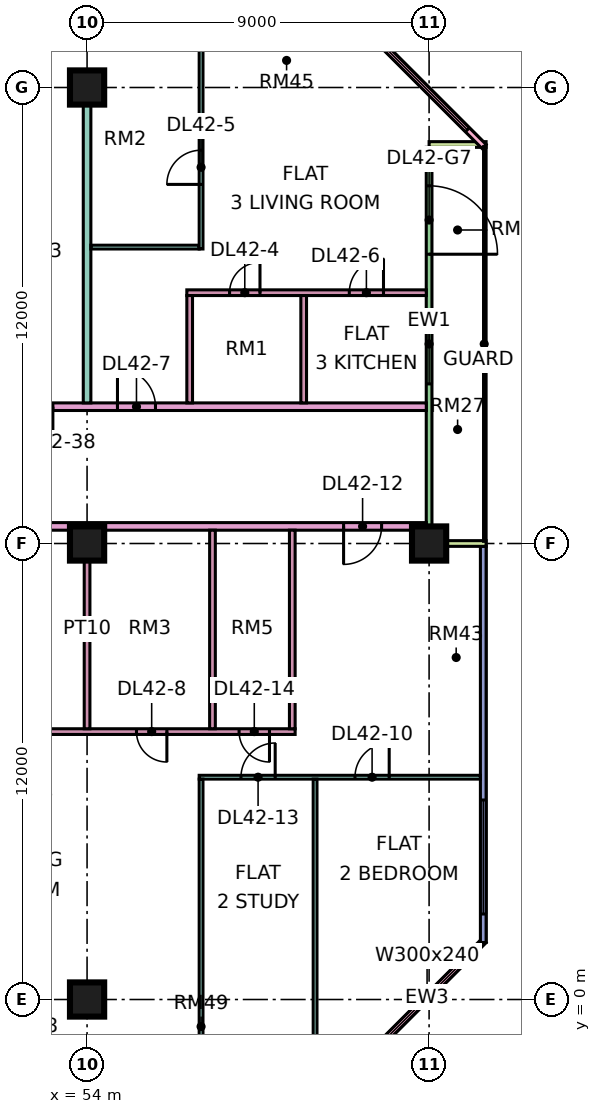
"""IFC4 building model, lengths in metres.
Left out: names, types, materials, properties, quantities, classifications, styles, units other than length and angle.
Written with IfcOpenShell. Run it as: python <this file> out.ifc"""

import sys

from ifc_helpers import new_model, si_unit, direction, frame, frame_2d, origin, origin_2d, place, context, subcontext, project, spatial, rectangle, extrude, element, fill, save


model = new_model("IFC4")
c1 = context("Model", 3, precision=1e-05, world=origin(), true_north=direction((0.0, 1.0)))
c2 = subcontext(c1, "Body", "Model", "MODEL_VIEW")
j1 = project(units=[si_unit("LENGTHUNIT", "METRE"), si_unit("PLANEANGLEUNIT", "RADIAN")], contexts=[c1])
p1 = place(None, origin())
s1 = spatial("IfcSite", under=j1, at=p1, CompositionType="ELEMENT")
p2 = place(p1, origin())
s2 = spatial("IfcBuilding", under=s1, at=p2, CompositionType="ELEMENT")
p3 = place(p2, frame((0.0, 0.0, 183.65)))
s3 = spatial("IfcBuildingStorey", under=s2, at=p3, CompositionType="ELEMENT", Elevation=183.65)
for number, where, z_axis, x_axis in (
    (1, (54.0, 0.0, 0.0), (0.0, 0.0, 1.0), (1.0, 0.0, 0.0)),
    (2, (54.0, 12.0, 0.0), (0.0, 0.0, 1.0), (1.0, 0.0, 0.0)),
    (3, (54.0, 24.0, 0.0), (0.0, 0.0, 1.0), (1.0, 0.0, 0.0)),
    (4, (63.0, 12.0, 0.0), (0.0, 0.0, 1.0), (1.0, 0.0, 0.0)),
):
    element("IfcColumn", number, at=place(p3, frame(where, z_axis=z_axis, x_axis=x_axis)), inside=s3, PredefinedType="COLUMN", context=c2, shape_type="SweptSolid", body=[
        extrude(rectangle(XDim=0.9, YDim=0.9, at=origin_2d()), origin(), (0.0, 0.0, 1.0), 3.75),
    ])
p4 = place(p3, frame((61.447, -1.447, 0.0), z_axis=(0.0, 0.0, 1.0), x_axis=(0.707106781187, 0.707106781187, 0.0)))
e5 = element("IfcWall", 5, at=p4, inside=s3, PredefinedType="SOLIDWALL", context=c2, shape_type="SweptSolid", body=[
    extrude(rectangle(XDim=4.243, YDim=0.15, at=frame_2d((2.121, 0.0))), origin(), (0.0, 0.0, 1.0), 3.35),
])
p5 = place(p4, frame((0.621, 0.0, 0.45)))
e6 = element("IfcOpeningElement", 6, at=p5, cuts=e5, PredefinedType="OPENING", context=c2, shape_type="SweptSolid", body=[
    extrude(rectangle(XDim=3.0, YDim=2.4, at=frame_2d((1.5, 1.2))), frame((0.0, 0.085, 0.0), z_axis=(0.0, -1.0, 0.0), x_axis=(1.0, 0.0, 0.0)), (0.0, 0.0, 1.0), 0.17),
])
p6 = place(p3, frame((64.425, 1.5, 0.0), z_axis=(0.0, 0.0, 1.0), x_axis=(0.0, 1.0, 0.0)))
e7 = element("IfcWall", 7, at=p6, inside=s3, PredefinedType="SOLIDWALL", context=c2, shape_type="SweptSolid", body=[
    extrude(rectangle(XDim=10.425, YDim=0.15, at=frame_2d((5.212, 0.0))), origin(), (0.0, 0.0, 1.0), 3.35),
])
p7 = place(p6, frame((0.75, 0.0, 0.45)))
e8 = element("IfcOpeningElement", 8, at=p7, cuts=e7, PredefinedType="OPENING", context=c2, shape_type="SweptSolid", body=[
    extrude(rectangle(XDim=3.0, YDim=2.4, at=frame_2d((1.5, 1.2))), frame((0.0, 0.085, 0.0), z_axis=(0.0, -1.0, 0.0), x_axis=(1.0, 0.0, 0.0)), (0.0, 0.0, 1.0), 0.17),
])
p8 = place(p3, frame((63.0, 12.075, 0.0), z_axis=(0.0, 0.0, 1.0), x_axis=(0.0, 1.0, 0.0)))
e9 = element("IfcWall", 9, at=p8, inside=s3, PredefinedType="SOLIDWALL", context=c2, shape_type="SweptSolid", body=[
    extrude(rectangle(XDim=10.35, YDim=0.15, at=frame_2d((5.175, 0.0))), origin(), (0.0, 0.0, 1.0), 3.35),
])
p9 = place(p8, frame((4.125, 0.0, 0.45)))
e10 = element("IfcOpeningElement", 10, at=p9, cuts=e9, PredefinedType="OPENING", context=c2, shape_type="SweptSolid", body=[
    extrude(rectangle(XDim=1.8, YDim=2.4, at=frame_2d((0.9, 1.2))), frame((0.0, 0.085, 0.0), z_axis=(0.0, -1.0, 0.0), x_axis=(1.0, 0.0, 0.0)), (0.0, 0.0, 1.0), 0.17),
])
p10 = place(p8, frame((7.538, 0.0, 0.0)))
e11 = element("IfcOpeningElement", 11, at=p10, cuts=e9, PredefinedType="OPENING", context=c2, shape_type="SweptSolid", body=[
    extrude(rectangle(XDim=1.8, YDim=2.4, at=frame_2d((0.9, 1.2))), frame((0.0, 0.085, 0.0), z_axis=(0.0, -1.0, 0.0), x_axis=(1.0, 0.0, 0.0)), (0.0, 0.0, 1.0), 0.17),
])
for number, where, z_axis, x_axis in (
    (12, (64.5, 12.0, 0.0), (0.0, 0.0, 1.0), (-1.0, 0.0, 0.0)),
    (13, (64.5, 22.5, 0.0), (0.0, 0.0, 1.0), (-1.0, 0.0, 0.0)),
):
    element("IfcWall", number, at=place(p3, frame(where, z_axis=z_axis, x_axis=x_axis)), inside=s3, PredefinedType="SOLIDWALL", context=c2, shape_type="SweptSolid", body=[
        extrude(rectangle(XDim=1.5, YDim=0.15, at=frame_2d((0.75, 0.0))), origin(), (0.0, 0.0, 1.0), 3.35),
    ])
p11 = place(p3, frame((64.447, 22.447, 0.0), z_axis=(0.0, 0.0, 1.0), x_axis=(-0.707106781187, 0.707106781187, 0.0)))
e14 = element("IfcWall", 14, at=p11, inside=s3, PredefinedType="SOLIDWALL", context=c2, shape_type="SweptSolid", body=[
    extrude(rectangle(XDim=4.243, YDim=0.15, at=frame_2d((2.121, 0.0))), origin(), (0.0, 0.0, 1.0), 3.35),
])
p12 = place(p11, frame((0.621, 0.0, 0.45)))
e15 = element("IfcOpeningElement", 15, at=p12, cuts=e14, PredefinedType="OPENING", context=c2, shape_type="SweptSolid", body=[
    extrude(rectangle(XDim=3.0, YDim=2.4, at=frame_2d((1.5, 1.2))), frame((0.0, 0.085, 0.0), z_axis=(0.0, -1.0, 0.0), x_axis=(1.0, 0.0, 0.0)), (0.0, 0.0, 1.0), 0.17),
])
p13 = place(p3, frame((40.65, 12.45, 0.0), z_axis=(0.0, 0.0, 1.0), x_axis=(1.0, 0.0, 0.0)))
e16 = element("IfcWall", 16, at=p13, inside=s3, PredefinedType="PARTITIONING", context=c2, shape_type="SweptSolid", body=[
    extrude(rectangle(XDim=22.276, YDim=0.2, at=frame_2d((11.138, 0.0))), origin(), (0.0, 0.0, 1.0), 3.35),
])
p14 = place(p13, frame((20.1, 0.0, 0.0)))
e17 = element("IfcOpeningElement", 17, at=p14, cuts=e16, PredefinedType="OPENING", context=c2, shape_type="SweptSolid", body=[
    extrude(rectangle(XDim=1.0, YDim=2.1, at=frame_2d((0.5, 1.05))), frame((0.0, 0.11, 0.0), z_axis=(0.0, -1.0, 0.0), x_axis=(1.0, 0.0, 0.0)), (0.0, 0.0, 1.0), 0.22),
])
p15 = place(p13, frame((1.05, 0.0, 0.0)))
e18 = element("IfcOpeningElement", 18, at=p15, cuts=e16, PredefinedType="OPENING", context=c2, shape_type="SweptSolid", body=[
    extrude(rectangle(XDim=1.0, YDim=2.1, at=frame_2d((0.5, 1.05))), frame((0.0, 0.11, 0.0), z_axis=(0.0, -1.0, 0.0), x_axis=(1.0, 0.0, 0.0)), (0.0, 0.0, 1.0), 0.22),
])
p16 = place(p3, frame((48.1, 7.05, 0.0), z_axis=(0.0, 0.0, 1.0), x_axis=(1.0, 0.0, 0.0)))
e19 = element("IfcWall", 19, at=p16, inside=s3, PredefinedType="PARTITIONING", context=c2, shape_type="SweptSolid", body=[
    extrude(rectangle(XDim=11.375, YDim=0.15, at=frame_2d((5.688, 0.0))), origin(), (0.0, 0.0, 1.0), 3.35),
])
p17 = place(p16, frame((7.2, 0.0, 0.0)))
e20 = element("IfcOpeningElement", 20, at=p17, cuts=e19, PredefinedType="OPENING", context=c2, shape_type="SweptSolid", body=[
    extrude(rectangle(XDim=0.8, YDim=2.1, at=frame_2d((0.4, 1.05))), frame((0.0, 0.085, 0.0), z_axis=(0.0, -1.0, 0.0), x_axis=(1.0, 0.0, 0.0)), (0.0, 0.0, 1.0), 0.17),
])
p18 = place(p16, frame((2.45, 0.0, 0.0)))
e21 = element("IfcOpeningElement", 21, at=p18, cuts=e19, PredefinedType="OPENING", context=c2, shape_type="SweptSolid", body=[
    extrude(rectangle(XDim=0.9, YDim=2.1, at=frame_2d((0.45, 1.05))), frame((0.0, 0.085, 0.0), z_axis=(0.0, -1.0, 0.0), x_axis=(1.0, 0.0, 0.0)), (0.0, 0.0, 1.0), 0.17),
])
p19 = place(p16, frame((9.9, 0.0, 0.0)))
e22 = element("IfcOpeningElement", 22, at=p19, cuts=e19, PredefinedType="OPENING", context=c2, shape_type="SweptSolid", body=[
    extrude(rectangle(XDim=0.8, YDim=2.1, at=frame_2d((0.4, 1.05))), frame((0.0, 0.085, 0.0), z_axis=(0.0, -1.0, 0.0), x_axis=(1.0, 0.0, 0.0)), (0.0, 0.0, 1.0), 0.17),
])
p20 = place(p3, frame((51.225, 15.6, 0.0), z_axis=(0.0, 0.0, 1.0), x_axis=(1.0, 0.0, 0.0)))
e23 = element("IfcWall", 23, at=p20, inside=s3, PredefinedType="PARTITIONING", context=c2, shape_type="SweptSolid", body=[
    extrude(rectangle(XDim=11.701, YDim=0.2, at=frame_2d((5.851, 0.0))), origin(), (0.0, 0.0, 1.0), 3.35),
])
p21 = place(p20, frame((3.575, 0.0, 0.0)))
e24 = element("IfcOpeningElement", 24, at=p21, cuts=e23, PredefinedType="OPENING", context=c2, shape_type="SweptSolid", body=[
    extrude(rectangle(XDim=1.0, YDim=2.1, at=frame_2d((0.5, 1.05))), frame((0.0, 0.11, 0.0), z_axis=(0.0, -1.0, 0.0), x_axis=(1.0, 0.0, 0.0)), (0.0, 0.0, 1.0), 0.22),
])
p22 = place(p20, frame((0.875, 0.0, 0.0)))
e25 = element("IfcOpeningElement", 25, at=p22, cuts=e23, PredefinedType="OPENING", context=c2, shape_type="SweptSolid", body=[
    extrude(rectangle(XDim=1.0, YDim=2.1, at=frame_2d((0.5, 1.05))), frame((0.0, 0.11, 0.0), z_axis=(0.0, -1.0, 0.0), x_axis=(1.0, 0.0, 0.0)), (0.0, 0.0, 1.0), 0.22),
])
p23 = place(p3, frame((54.0, 7.125, 0.0), z_axis=(0.0, 0.0, 1.0), x_axis=(0.0, 1.0, 0.0)))
e26 = element("IfcWall", 26, at=p23, inside=s3, PredefinedType="PARTITIONING", context=c2, shape_type="SweptSolid", body=[
    extrude(rectangle(XDim=5.225, YDim=0.15, at=frame_2d((2.613, 0.0))), origin(), (0.0, 0.0, 1.0), 3.35),
])
p24 = place(p3, frame((54.0, 15.7, 0.0), z_axis=(0.0, 0.0, 1.0), x_axis=(0.0, 1.0, 0.0)))
e27 = element("IfcWall", 27, at=p24, inside=s3, PredefinedType="PARTITIONING", context=c2, shape_type="SweptSolid", body=[
    extrude(rectangle(XDim=8.3, YDim=0.2, at=frame_2d((4.15, 0.0))), origin(), (0.0, 0.0, 1.0), 3.35),
])
p25 = place(p3, frame((54.1, 19.8, 0.0), z_axis=(0.0, 0.0, 1.0), x_axis=(1.0, 0.0, 0.0)))
e28 = element("IfcWall", 28, at=p25, inside=s3, PredefinedType="PARTITIONING", context=c2, shape_type="SweptSolid", body=[
    extrude(rectangle(XDim=2.85, YDim=0.1, at=frame_2d((1.425, 0.0))), origin(), (0.0, 0.0, 1.0), 3.35),
])
p26 = place(p3, frame((56.625, 18.6, 0.0), z_axis=(0.0, 0.0, 1.0), x_axis=(1.0, 0.0, 0.0)))
e29 = element("IfcWall", 29, at=p26, inside=s3, PredefinedType="PARTITIONING", context=c2, shape_type="SweptSolid", body=[
    extrude(rectangle(XDim=6.301, YDim=0.15, at=frame_2d((3.15, 0.0))), origin(), (0.0, 0.0, 1.0), 3.35),
])
p27 = place(p26, frame((1.125, 0.0, 0.0)))
e30 = element("IfcOpeningElement", 30, at=p27, cuts=e29, PredefinedType="OPENING", context=c2, shape_type="SweptSolid", body=[
    extrude(rectangle(XDim=0.8, YDim=2.1, at=frame_2d((0.4, 1.05))), frame((0.0, 0.085, 0.0), z_axis=(0.0, -1.0, 0.0), x_axis=(1.0, 0.0, 0.0)), (0.0, 0.0, 1.0), 0.17),
])
p28 = place(p26, frame((4.275, 0.0, 0.0)))
e31 = element("IfcOpeningElement", 31, at=p28, cuts=e29, PredefinedType="OPENING", context=c2, shape_type="SweptSolid", body=[
    extrude(rectangle(XDim=0.9, YDim=2.1, at=frame_2d((0.45, 1.05))), frame((0.0, 0.085, 0.0), z_axis=(0.0, -1.0, 0.0), x_axis=(1.0, 0.0, 0.0)), (0.0, 0.0, 1.0), 0.17),
])
p29 = place(p3, frame((56.7, 15.7, 0.0), z_axis=(0.0, 0.0, 1.0), x_axis=(0.0, 1.0, 0.0)))
e32 = element("IfcWall", 32, at=p29, inside=s3, PredefinedType="PARTITIONING", context=c2, shape_type="SweptSolid", body=[
    extrude(rectangle(XDim=2.825, YDim=0.15, at=frame_2d((1.413, 0.0))), origin(), (0.0, 0.0, 1.0), 3.35),
])
p30 = place(p3, frame((56.95, 5.85, 0.0), z_axis=(0.0, 0.0, 1.0), x_axis=(1.0, 0.0, 0.0)))
e33 = element("IfcWall", 33, at=p30, inside=s3, PredefinedType="PARTITIONING", context=c2, shape_type="SweptSolid", body=[
    extrude(rectangle(XDim=7.4, YDim=0.1, at=frame_2d((3.7, 0.0))), origin(), (0.0, 0.0, 1.0), 3.35),
])
p31 = place(p30, frame((4.1, 0.0, 0.0)))
e34 = element("IfcOpeningElement", 34, at=p31, cuts=e33, PredefinedType="OPENING", context=c2, shape_type="SweptSolid", body=[
    extrude(rectangle(XDim=0.9, YDim=2.1, at=frame_2d((0.45, 1.05))), frame((0.0, 0.06, 0.0), z_axis=(0.0, -1.0, 0.0), x_axis=(1.0, 0.0, 0.0)), (0.0, 0.0, 1.0), 0.12),
])
p32 = place(p30, frame((1.1, 0.0, 0.0)))
e35 = element("IfcOpeningElement", 35, at=p32, cuts=e33, PredefinedType="OPENING", context=c2, shape_type="SweptSolid", body=[
    extrude(rectangle(XDim=0.9, YDim=2.1, at=frame_2d((0.45, 1.05))), frame((0.0, 0.06, 0.0), z_axis=(0.0, -1.0, 0.0), x_axis=(1.0, 0.0, 0.0)), (0.0, 0.0, 1.0), 0.12),
])
p33 = place(p3, frame((57.0, -1.35, 0.0), z_axis=(0.0, 0.0, 1.0), x_axis=(0.0, 1.0, 0.0)))
e36 = element("IfcWall", 36, at=p33, inside=s3, PredefinedType="PARTITIONING", context=c2, shape_type="SweptSolid", body=[
    extrude(rectangle(XDim=7.15, YDim=0.1, at=frame_2d((3.575, 0.0))), origin(), (0.0, 0.0, 1.0), 3.35),
])
p34 = place(p3, frame((57.0, 19.75, 0.0), z_axis=(0.0, 0.0, 1.0), x_axis=(0.0, 1.0, 0.0)))
e37 = element("IfcWall", 37, at=p34, inside=s3, PredefinedType="PARTITIONING", context=c2, shape_type="SweptSolid", body=[
    extrude(rectangle(XDim=5.6, YDim=0.1, at=frame_2d((2.8, 0.0))), origin(), (0.0, 0.0, 1.0), 3.35),
])
p35 = place(p34, frame((1.7, 0.0, 0.0)))
e38 = element("IfcOpeningElement", 38, at=p35, cuts=e37, PredefinedType="OPENING", context=c2, shape_type="SweptSolid", body=[
    extrude(rectangle(XDim=0.9, YDim=2.1, at=frame_2d((0.45, 1.05))), frame((0.0, 0.06, 0.0), z_axis=(0.0, -1.0, 0.0), x_axis=(1.0, 0.0, 0.0)), (0.0, 0.0, 1.0), 0.12),
])
for number, where, z_axis, x_axis in (
    (39, (57.3, 7.125, 0.0), (0.0, 0.0, 1.0), (0.0, 1.0, 0.0)),
    (40, (59.4, 7.125, 0.0), (0.0, 0.0, 1.0), (0.0, 1.0, 0.0)),
):
    element("IfcWall", number, at=place(p3, frame(where, z_axis=z_axis, x_axis=x_axis)), inside=s3, PredefinedType="PARTITIONING", context=c2, shape_type="SweptSolid", body=[
        extrude(rectangle(XDim=5.225, YDim=0.15, at=frame_2d((2.613, 0.0))), origin(), (0.0, 0.0, 1.0), 3.35),
    ])
p36 = place(p3, frame((59.7, 15.7, 0.0), z_axis=(0.0, 0.0, 1.0), x_axis=(0.0, 1.0, 0.0)))
e41 = element("IfcWall", 41, at=p36, inside=s3, PredefinedType="PARTITIONING", context=c2, shape_type="SweptSolid", body=[
    extrude(rectangle(XDim=2.825, YDim=0.15, at=frame_2d((1.413, 0.0))), origin(), (0.0, 0.0, 1.0), 3.35),
])
p37 = place(p3, frame((60.0, -1.35, 0.0), z_axis=(0.0, 0.0, 1.0), x_axis=(0.0, 1.0, 0.0)))
e42 = element("IfcWall", 42, at=p37, inside=s3, PredefinedType="PARTITIONING", context=c2, shape_type="SweptSolid", body=[
    extrude(rectangle(XDim=7.15, YDim=0.1, at=frame_2d((3.575, 0.0))), origin(), (0.0, 0.0, 1.0), 3.35),
])
p38 = place(p5, origin())
e43 = element("IfcWindow", 43, at=p38, inside=s3, PartitioningType="SINGLE_PANEL", PredefinedType="WINDOW", context=c2, shape_type="SweptSolid", body=[
    extrude(rectangle(XDim=3.0, YDim=2.4, at=frame_2d((1.5, 1.2))), frame((0.0, 0.03, 0.0), z_axis=(0.0, -1.0, 0.0), x_axis=(1.0, 0.0, 0.0)), (0.0, 0.0, 1.0), 0.06),
])
fill(e6, e43)
p39 = place(p7, origin())
e44 = element("IfcWindow", 44, at=p39, inside=s3, PartitioningType="SINGLE_PANEL", PredefinedType="WINDOW", context=c2, shape_type="SweptSolid", body=[
    extrude(rectangle(XDim=3.0, YDim=2.4, at=frame_2d((1.5, 1.2))), frame((0.0, 0.03, 0.0), z_axis=(0.0, -1.0, 0.0), x_axis=(1.0, 0.0, 0.0)), (0.0, 0.0, 1.0), 0.06),
])
fill(e8, e44)
p40 = place(p9, origin())
e45 = element("IfcWindow", 45, at=p40, inside=s3, PartitioningType="SINGLE_PANEL", PredefinedType="WINDOW", context=c2, shape_type="SweptSolid", body=[
    extrude(rectangle(XDim=1.8, YDim=2.4, at=frame_2d((0.9, 1.2))), frame((0.0, 0.03, 0.0), z_axis=(0.0, -1.0, 0.0), x_axis=(1.0, 0.0, 0.0)), (0.0, 0.0, 1.0), 0.06),
])
fill(e10, e45)
p41 = place(p10, frame((1.8, 0.0, 0.0), z_axis=(0.0, 0.0, 1.0), x_axis=(-1.0, 0.0, 0.0)))
e46 = element("IfcDoor", 46, at=p41, inside=s3, OperationType="DOUBLE_DOOR_SINGLE_SWING", PredefinedType="DOOR", context=c2, shape_type="SweptSolid", body=[
    extrude(rectangle(XDim=1.8, YDim=2.4, at=frame_2d((0.9, 1.2))), frame((0.0, 0.025, 0.0), z_axis=(0.0, -1.0, 0.0), x_axis=(1.0, 0.0, 0.0)), (0.0, 0.0, 1.0), 0.05),
])
fill(e11, e46)
p42 = place(p12, origin())
e47 = element("IfcWindow", 47, at=p42, inside=s3, PartitioningType="SINGLE_PANEL", PredefinedType="WINDOW", context=c2, shape_type="SweptSolid", body=[
    extrude(rectangle(XDim=3.0, YDim=2.4, at=frame_2d((1.5, 1.2))), frame((0.0, 0.03, 0.0), z_axis=(0.0, -1.0, 0.0), x_axis=(1.0, 0.0, 0.0)), (0.0, 0.0, 1.0), 0.06),
])
fill(e15, e47)
p43 = place(p27, frame((0.8, 0.0, 0.0), z_axis=(0.0, 0.0, 1.0), x_axis=(-1.0, 0.0, 0.0)))
e48 = element("IfcDoor", 48, at=p43, inside=s3, OperationType="SINGLE_SWING_RIGHT", PredefinedType="DOOR", context=c2, shape_type="SweptSolid", body=[
    extrude(rectangle(XDim=0.8, YDim=2.1, at=frame_2d((0.4, 1.05))), frame((0.0, 0.025, 0.0), z_axis=(0.0, -1.0, 0.0), x_axis=(1.0, 0.0, 0.0)), (0.0, 0.0, 1.0), 0.05),
])
fill(e30, e48)
p44 = place(p35, origin())
e49 = element("IfcDoor", 49, at=p44, inside=s3, OperationType="SINGLE_SWING_LEFT", PredefinedType="DOOR", context=c2, shape_type="SweptSolid", body=[
    extrude(rectangle(XDim=0.9, YDim=2.1, at=frame_2d((0.45, 1.05))), frame((0.0, 0.025, 0.0), z_axis=(0.0, -1.0, 0.0), x_axis=(1.0, 0.0, 0.0)), (0.0, 0.0, 1.0), 0.05),
])
fill(e38, e49)
p45 = place(p28, frame((0.9, 0.0, 0.0), z_axis=(0.0, 0.0, 1.0), x_axis=(-1.0, 0.0, 0.0)))
e50 = element("IfcDoor", 50, at=p45, inside=s3, OperationType="SINGLE_SWING_RIGHT", PredefinedType="DOOR", context=c2, shape_type="SweptSolid", body=[
    extrude(rectangle(XDim=0.9, YDim=2.1, at=frame_2d((0.45, 1.05))), frame((0.0, 0.025, 0.0), z_axis=(0.0, -1.0, 0.0), x_axis=(1.0, 0.0, 0.0)), (0.0, 0.0, 1.0), 0.05),
])
fill(e31, e50)
p46 = place(p21, origin())
e51 = element("IfcDoor", 51, at=p46, inside=s3, OperationType="SINGLE_SWING_LEFT", PredefinedType="DOOR", context=c2, shape_type="SweptSolid", body=[
    extrude(rectangle(XDim=1.0, YDim=2.1, at=frame_2d((0.5, 1.05))), frame((0.0, 0.025, 0.0), z_axis=(0.0, -1.0, 0.0), x_axis=(1.0, 0.0, 0.0)), (0.0, 0.0, 1.0), 0.05),
])
fill(e24, e51)
p47 = place(p17, origin())
e52 = element("IfcDoor", 52, at=p47, inside=s3, OperationType="SINGLE_SWING_RIGHT", PredefinedType="DOOR", context=c2, shape_type="SweptSolid", body=[
    extrude(rectangle(XDim=0.8, YDim=2.1, at=frame_2d((0.4, 1.05))), frame((0.0, 0.025, 0.0), z_axis=(0.0, -1.0, 0.0), x_axis=(1.0, 0.0, 0.0)), (0.0, 0.0, 1.0), 0.05),
])
fill(e20, e52)
p48 = place(p31, frame((0.9, 0.0, 0.0), z_axis=(0.0, 0.0, 1.0), x_axis=(-1.0, 0.0, 0.0)))
e53 = element("IfcDoor", 53, at=p48, inside=s3, OperationType="SINGLE_SWING_RIGHT", PredefinedType="DOOR", context=c2, shape_type="SweptSolid", body=[
    extrude(rectangle(XDim=0.9, YDim=2.1, at=frame_2d((0.45, 1.05))), frame((0.0, 0.025, 0.0), z_axis=(0.0, -1.0, 0.0), x_axis=(1.0, 0.0, 0.0)), (0.0, 0.0, 1.0), 0.05),
])
fill(e34, e53)
p49 = place(p14, frame((1.0, 0.0, 0.0), z_axis=(0.0, 0.0, 1.0), x_axis=(-1.0, 0.0, 0.0)))
e54 = element("IfcDoor", 54, at=p49, inside=s3, OperationType="SINGLE_SWING_LEFT", PredefinedType="DOOR", context=c2, shape_type="SweptSolid", body=[
    extrude(rectangle(XDim=1.0, YDim=2.1, at=frame_2d((0.5, 1.05))), frame((0.0, 0.025, 0.0), z_axis=(0.0, -1.0, 0.0), x_axis=(1.0, 0.0, 0.0)), (0.0, 0.0, 1.0), 0.05),
])
fill(e17, e54)
p50 = place(p32, frame((0.9, 0.0, 0.0), z_axis=(0.0, 0.0, 1.0), x_axis=(-1.0, 0.0, 0.0)))
e55 = element("IfcDoor", 55, at=p50, inside=s3, OperationType="SINGLE_SWING_RIGHT", PredefinedType="DOOR", context=c2, shape_type="SweptSolid", body=[
    extrude(rectangle(XDim=0.9, YDim=2.1, at=frame_2d((0.45, 1.05))), frame((0.0, 0.025, 0.0), z_axis=(0.0, -1.0, 0.0), x_axis=(1.0, 0.0, 0.0)), (0.0, 0.0, 1.0), 0.05),
])
fill(e35, e55)
p51 = place(p19, origin())
e56 = element("IfcDoor", 56, at=p51, inside=s3, OperationType="SINGLE_SWING_RIGHT", PredefinedType="DOOR", context=c2, shape_type="SweptSolid", body=[
    extrude(rectangle(XDim=0.8, YDim=2.1, at=frame_2d((0.4, 1.05))), frame((0.0, 0.025, 0.0), z_axis=(0.0, -1.0, 0.0), x_axis=(1.0, 0.0, 0.0)), (0.0, 0.0, 1.0), 0.05),
])
fill(e22, e56)
p52 = place(p22, origin())
e57 = element("IfcDoor", 57, at=p52, inside=s3, OperationType="SINGLE_SWING_RIGHT", PredefinedType="DOOR", context=c2, shape_type="SweptSolid", body=[
    extrude(rectangle(XDim=1.0, YDim=2.1, at=frame_2d((0.5, 1.05))), frame((0.0, 0.025, 0.0), z_axis=(0.0, -1.0, 0.0), x_axis=(1.0, 0.0, 0.0)), (0.0, 0.0, 1.0), 0.05),
])
fill(e25, e57)
save(model, sys.argv[1])
